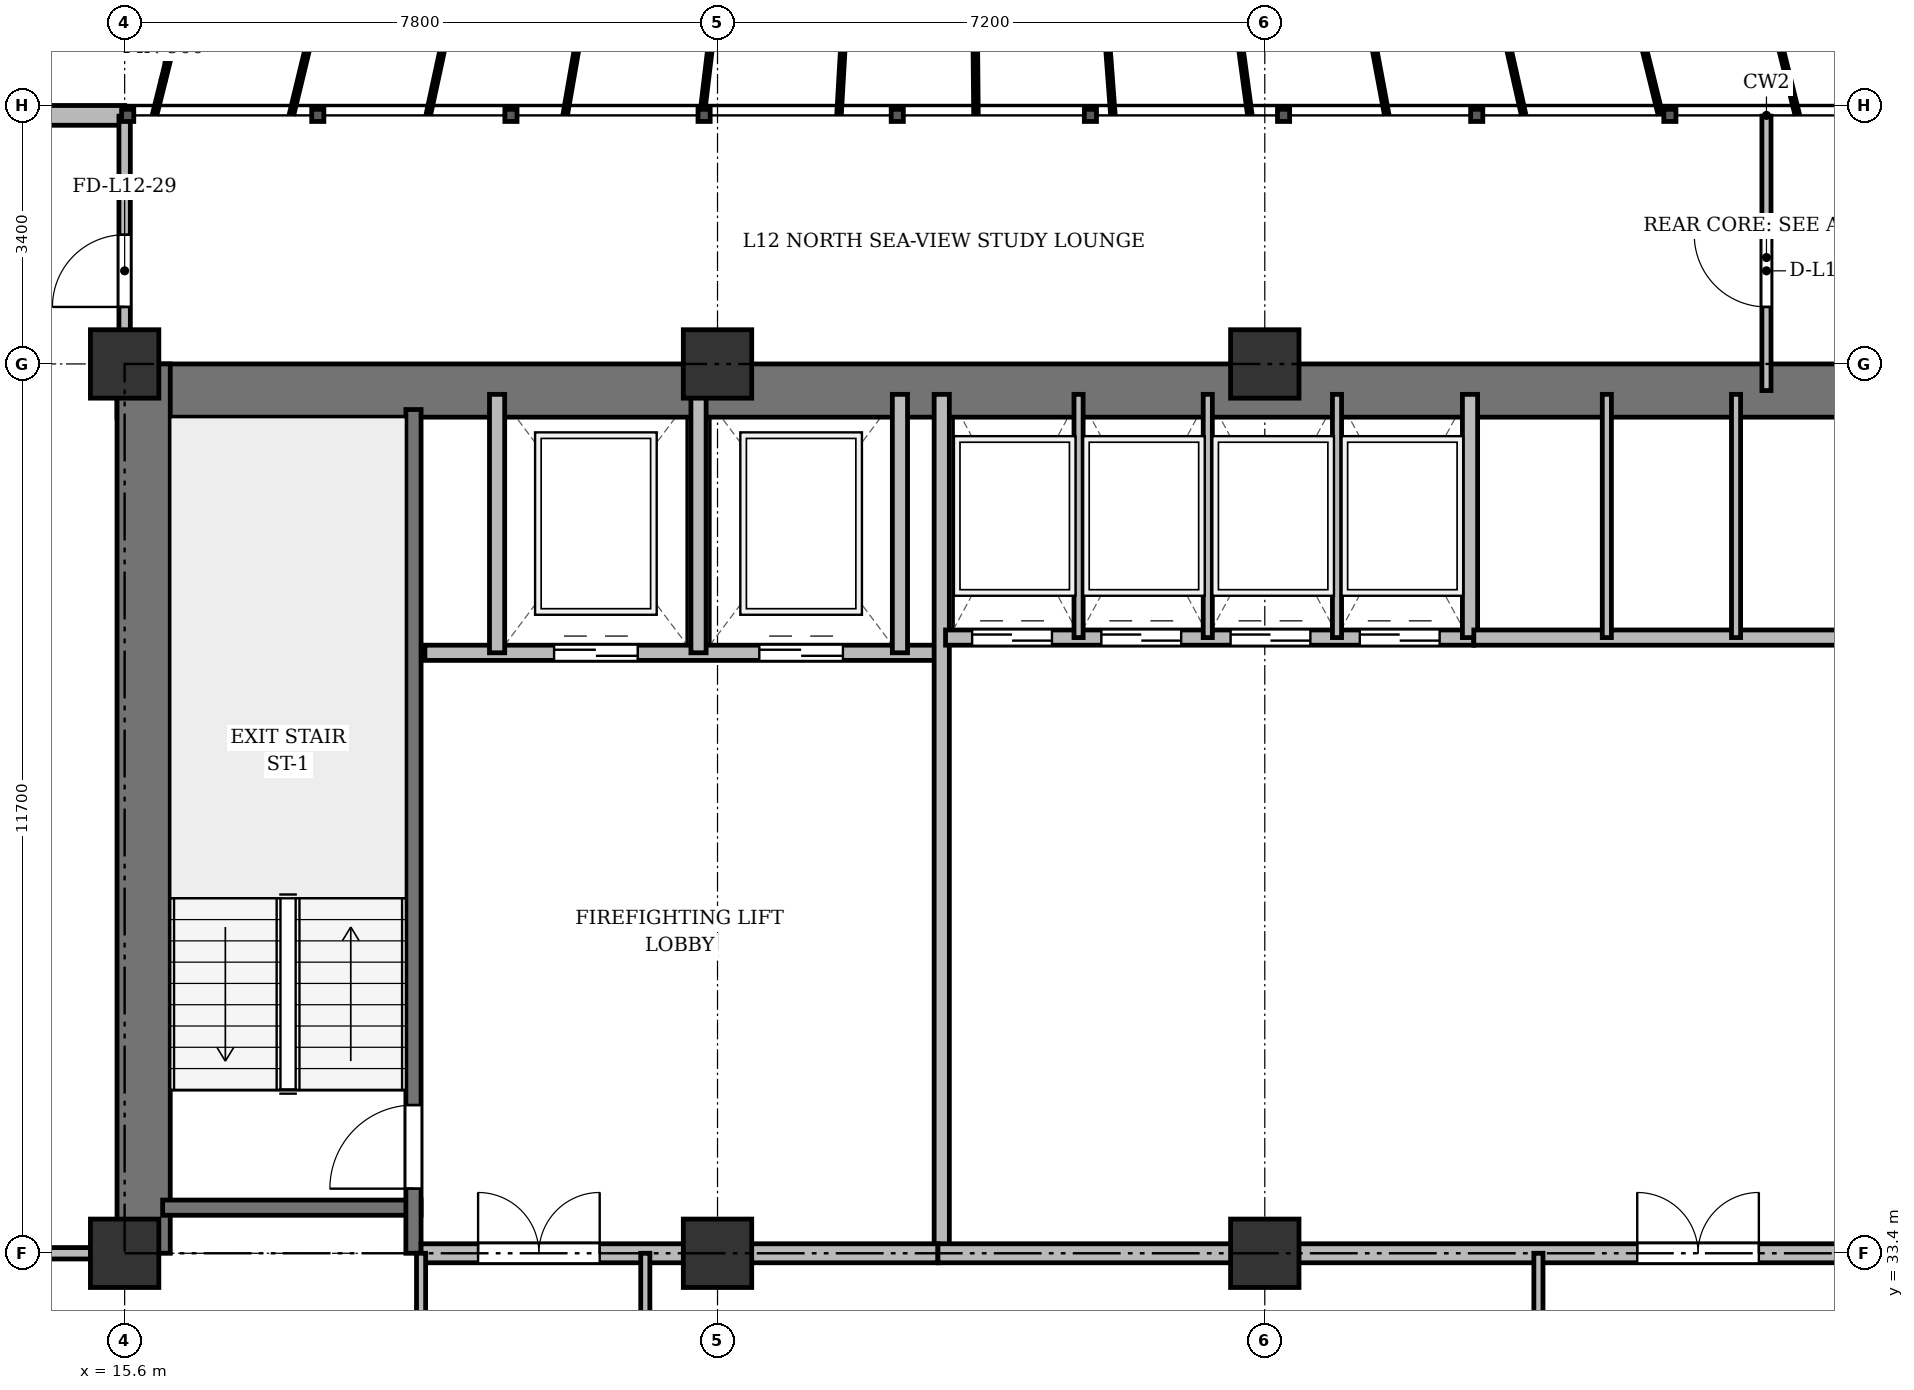
"""IFC4 building model, lengths in metres.
Left out: names, types, materials, properties, quantities, classifications, styles, units other than length and angle.
Written with IfcOpenShell. Run it as: python <this file> out.ifc"""

import sys

from ifc_helpers import new_model, si_unit, direction, frame, frame_2d, origin, origin_2d, place, context, subcontext, project, spatial, rectangle, extrude, source, transform, mapped, element, fill, save


model = new_model("IFC4")
c1 = context("Model", 3, precision=1e-05, world=origin(), true_north=direction((0.0, 1.0)))
c2 = subcontext(c1, "Body", "Model", "MODEL_VIEW")
j1 = project(units=[si_unit("LENGTHUNIT", "METRE"), si_unit("PLANEANGLEUNIT", "RADIAN")], contexts=[c1])
p1 = place(None, origin())
s1 = spatial("IfcSite", under=j1, at=p1, CompositionType="ELEMENT")
p2 = place(p1, origin())
s2 = spatial("IfcBuilding", under=s1, at=p2, CompositionType="ELEMENT")
p3 = place(p2, frame((0.0, 0.0, 48.7)))
s3 = spatial("IfcBuildingStorey", under=s2, at=p3, CompositionType="ELEMENT", Elevation=48.7)
m1 = source(origin(), c2, "Body", "SweptSolid", [
    extrude(rectangle(XDim=0.9, YDim=0.9, at=origin_2d()), origin(), (0.0, 0.0, 1.0), 3.6),
])
for number, where, z_axis, x_axis in (
    (1, (15.6, 33.4, 0.0), (0.0, 0.0, 1.0), (1.0, 0.0, 0.0)),
    (2, (15.6, 45.1, 0.0), (0.0, 0.0, 1.0), (1.0, 0.0, 0.0)),
    (3, (23.4, 33.4, 0.0), (0.0, 0.0, 1.0), (1.0, 0.0, 0.0)),
    (4, (23.4, 45.1, 0.0), (0.0, 0.0, 1.0), (1.0, 0.0, 0.0)),
    (5, (30.6, 33.4, 0.0), (0.0, 0.0, 1.0), (1.0, 0.0, 0.0)),
    (6, (30.6, 45.1, 0.0), (0.0, 0.0, 1.0), (1.0, 0.0, 0.0)),
):
    element("IfcColumn", number, at=place(p3, frame(where, z_axis=z_axis, x_axis=x_axis)), inside=s3, PredefinedType="COLUMN", context=c2, shape_type="MappedRepresentation", body=[
        mapped(m1, transform((0.0, 0.0, 0.0), x_axis=(1.0, 0.0, 0.0), y_axis=(0.0, 1.0, 0.0), z_axis=(0.0, 0.0, 1.0), scale=1.0)),
    ])
p4 = place(p3, frame((7.6, 48.37, 0.0), z_axis=(0.0, 0.0, 1.0), x_axis=(1.0, 0.0, 0.0)))
e7 = element("IfcWall", 7, at=p4, inside=s3, PredefinedType="SOLIDWALL", context=c2, shape_type="SweptSolid", body=[
    extrude(rectangle(XDim=8.0, YDim=0.26, at=frame_2d((4.0, 0.0))), origin(), (0.0, 0.0, 1.0), 3.34),
])
p5 = place(p4, frame((3.308, 0.0, 0.9)))
e8 = element("IfcOpeningElement", 8, at=p5, cuts=e7, PredefinedType="OPENING", context=c2, shape_type="SweptSolid", body=[
    extrude(rectangle(XDim=1.2, YDim=1.65, at=frame_2d((0.6, 0.825))), frame((0.0, 0.14, 0.0), z_axis=(0.0, -1.0, 0.0), x_axis=(1.0, 0.0, 0.0)), (0.0, 0.0, 1.0), 0.28),
])
p6 = place(p3, frame((15.5, 44.75, 0.0), z_axis=(0.0, 0.0, 1.0), x_axis=(1.0, 0.0, 0.0)))
e9 = element("IfcWall", 9, at=p6, inside=s3, PredefinedType="SHEAR", context=c2, shape_type="SweptSolid", body=[
    extrude(rectangle(XDim=43.4, YDim=0.7, at=frame_2d((21.7, 0.0))), origin(), (0.0, 0.0, 1.0), 3.34),
])
p7 = place(p3, frame((15.85, 33.4, 0.0), z_axis=(0.0, 0.0, 1.0), x_axis=(0.0, 1.0, 0.0)))
e10 = element("IfcWall", 10, at=p7, inside=s3, PredefinedType="SHEAR", context=c2, shape_type="SweptSolid", body=[
    extrude(rectangle(XDim=11.7, YDim=0.7, at=frame_2d((5.85, 0.0))), origin(), (0.0, 0.0, 1.0), 3.34),
])
p8 = place(p3, frame((16.1, 34.0, 0.0), z_axis=(0.0, 0.0, 1.0), x_axis=(1.0, 0.0, 0.0)))
e11 = element("IfcWall", 11, at=p8, inside=s3, PredefinedType="SHEAR", context=c2, shape_type="SweptSolid", body=[
    extrude(rectangle(XDim=3.4, YDim=0.2, at=frame_2d((1.7, 0.0))), origin(), (0.0, 0.0, 1.0), 3.34),
])
p9 = place(p3, frame((19.4, 33.4, 0.0), z_axis=(0.0, 0.0, 1.0), x_axis=(0.0, 1.0, 0.0)))
e12 = element("IfcWall", 12, at=p9, inside=s3, PredefinedType="SHEAR", context=c2, shape_type="SweptSolid", body=[
    extrude(rectangle(XDim=11.1, YDim=0.2, at=frame_2d((5.55, 0.0))), origin(), (0.0, 0.0, 1.0), 3.34),
])
p10 = place(p9, frame((0.85, 0.0, 0.0)))
e13 = element("IfcOpeningElement", 13, at=p10, cuts=e12, PredefinedType="OPENING", context=c2, shape_type="SweptSolid", body=[
    extrude(rectangle(XDim=1.1, YDim=2.15, at=frame_2d((0.55, 1.075))), frame((0.0, 0.11, 0.0), z_axis=(0.0, -1.0, 0.0), x_axis=(1.0, 0.0, 0.0)), (0.0, 0.0, 1.0), 0.22),
])
p11 = place(p3, frame((19.55, 41.3, 0.0), z_axis=(0.0, 0.0, 1.0), x_axis=(1.0, 0.0, 0.0)))
e14 = element("IfcWall", 14, at=p11, inside=s3, PredefinedType="SOLIDWALL", context=c2, shape_type="SweptSolid", body=[
    extrude(rectangle(XDim=6.75, YDim=0.2, at=frame_2d((3.375, 0.0))), origin(), (0.0, 0.0, 1.0), 3.34),
])
p12 = place(p11, frame((1.7, 0.0, 0.0)))
e15 = element("IfcOpeningElement", 15, at=p12, cuts=e14, PredefinedType="OPENING", context=c2, shape_type="SweptSolid", body=[
    extrude(rectangle(XDim=1.1, YDim=2.15, at=frame_2d((0.55, 1.075))), frame((0.0, 0.11, 0.0), z_axis=(0.0, -1.0, 0.0), x_axis=(1.0, 0.0, 0.0)), (0.0, 0.0, 1.0), 0.22),
])
p13 = place(p11, frame((4.4, 0.0, 0.0)))
e16 = element("IfcOpeningElement", 16, at=p13, cuts=e14, PredefinedType="OPENING", context=c2, shape_type="SweptSolid", body=[
    extrude(rectangle(XDim=1.1, YDim=2.15, at=frame_2d((0.55, 1.075))), frame((0.0, 0.11, 0.0), z_axis=(0.0, -1.0, 0.0), x_axis=(1.0, 0.0, 0.0)), (0.0, 0.0, 1.0), 0.22),
])
for number, where, z_axis, x_axis in (
    (17, (20.5, 41.3, 0.0), (0.0, 0.0, 1.0), (0.0, 1.0, 0.0)),
    (18, (23.15, 41.3, 0.0), (0.0, 0.0, 1.0), (0.0, 1.0, 0.0)),
    (19, (25.8, 41.3, 0.0), (0.0, 0.0, 1.0), (0.0, 1.0, 0.0)),
):
    element("IfcWall", number, at=place(p3, frame(where, z_axis=z_axis, x_axis=x_axis)), inside=s3, PredefinedType="SOLIDWALL", context=c2, shape_type="SweptSolid", body=[
        extrude(rectangle(XDim=3.4, YDim=0.2, at=frame_2d((1.7, 0.0))), origin(), (0.0, 0.0, 1.0), 3.34),
    ])
p14 = place(p3, frame((26.35, 33.4, 0.0), z_axis=(0.0, 0.0, 1.0), x_axis=(0.0, 1.0, 0.0)))
e20 = element("IfcWall", 20, at=p14, inside=s3, PredefinedType="SOLIDWALL", context=c2, shape_type="SweptSolid", body=[
    extrude(rectangle(XDim=11.3, YDim=0.2, at=frame_2d((5.65, 0.0))), origin(), (0.0, 0.0, 1.0), 2.69),
])
p15 = place(p3, frame((19.5, 33.4, 0.0), z_axis=(0.0, 0.0, 1.0), x_axis=(1.0, 0.0, 0.0)))
e21 = element("IfcWall", 21, at=p15, inside=s3, PredefinedType="PARTITIONING", context=c2, shape_type="SweptSolid", body=[
    extrude(rectangle(XDim=6.8, YDim=0.25, at=frame_2d((3.4, 0.0))), origin(), (0.0, 0.0, 1.0), 2.69),
])
p16 = place(p15, frame((0.75, 0.0, 0.0)))
e22 = element("IfcOpeningElement", 22, at=p16, cuts=e21, PredefinedType="OPENING", context=c2, shape_type="SweptSolid", body=[
    extrude(rectangle(XDim=1.6, YDim=2.2, at=frame_2d((0.8, 1.1))), frame((0.0, 0.135, 0.0), z_axis=(0.0, -1.0, 0.0), x_axis=(1.0, 0.0, 0.0)), (0.0, 0.0, 1.0), 0.27),
])
p17 = place(p3, frame((26.4, 41.5, 0.0), z_axis=(0.0, 0.0, 1.0), x_axis=(1.0, 0.0, 0.0)))
e23 = element("IfcWall", 23, at=p17, inside=s3, PredefinedType="SOLIDWALL", context=c2, shape_type="SweptSolid", body=[
    extrude(rectangle(XDim=6.95, YDim=0.2, at=frame_2d((3.475, 0.0))), origin(), (0.0, 0.0, 1.0), 3.34),
])
p18 = place(p17, frame((0.35, 0.0, 0.0)))
e24 = element("IfcOpeningElement", 24, at=p18, cuts=e23, PredefinedType="OPENING", context=c2, shape_type="SweptSolid", body=[
    extrude(rectangle(XDim=1.05, YDim=2.15, at=frame_2d((0.525, 1.075))), frame((0.0, 0.11, 0.0), z_axis=(0.0, -1.0, 0.0), x_axis=(1.0, 0.0, 0.0)), (0.0, 0.0, 1.0), 0.22),
])
p19 = place(p17, frame((2.05, 0.0, 0.0)))
e25 = element("IfcOpeningElement", 25, at=p19, cuts=e23, PredefinedType="OPENING", context=c2, shape_type="SweptSolid", body=[
    extrude(rectangle(XDim=1.05, YDim=2.15, at=frame_2d((0.525, 1.075))), frame((0.0, 0.11, 0.0), z_axis=(0.0, -1.0, 0.0), x_axis=(1.0, 0.0, 0.0)), (0.0, 0.0, 1.0), 0.22),
])
p20 = place(p17, frame((3.75, 0.0, 0.0)))
e26 = element("IfcOpeningElement", 26, at=p20, cuts=e23, PredefinedType="OPENING", context=c2, shape_type="SweptSolid", body=[
    extrude(rectangle(XDim=1.05, YDim=2.15, at=frame_2d((0.525, 1.075))), frame((0.0, 0.11, 0.0), z_axis=(0.0, -1.0, 0.0), x_axis=(1.0, 0.0, 0.0)), (0.0, 0.0, 1.0), 0.22),
])
p21 = place(p17, frame((5.45, 0.0, 0.0)))
e27 = element("IfcOpeningElement", 27, at=p21, cuts=e23, PredefinedType="OPENING", context=c2, shape_type="SweptSolid", body=[
    extrude(rectangle(XDim=1.05, YDim=2.15, at=frame_2d((0.525, 1.075))), frame((0.0, 0.11, 0.0), z_axis=(0.0, -1.0, 0.0), x_axis=(1.0, 0.0, 0.0)), (0.0, 0.0, 1.0), 0.22),
])
p22 = place(p3, frame((33.3, 41.5, 0.0), z_axis=(0.0, 0.0, 1.0), x_axis=(0.0, 1.0, 0.0)))
e28 = element("IfcWall", 28, at=p22, inside=s3, PredefinedType="SOLIDWALL", context=c2, shape_type="SweptSolid", body=[
    extrude(rectangle(XDim=3.2, YDim=0.2, at=frame_2d((1.6, 0.0))), origin(), (0.0, 0.0, 1.0), 3.34),
])
for number, where, z_axis, x_axis in (
    (29, (28.15, 41.5, 0.0), (0.0, 0.0, 1.0), (0.0, 1.0, 0.0)),
    (30, (29.85, 41.5, 0.0), (0.0, 0.0, 1.0), (0.0, 1.0, 0.0)),
    (31, (31.55, 41.5, 0.0), (0.0, 0.0, 1.0), (0.0, 1.0, 0.0)),
):
    element("IfcWall", number, at=place(p3, frame(where, z_axis=z_axis, x_axis=x_axis)), inside=s3, PredefinedType="PARTITIONING", context=c2, shape_type="SweptSolid", body=[
        extrude(rectangle(XDim=3.2, YDim=0.12, at=frame_2d((1.6, 0.0))), origin(), (0.0, 0.0, 1.0), 3.34),
    ])
p23 = place(p3, frame((33.35, 41.5, 0.0), z_axis=(0.0, 0.0, 1.0), x_axis=(1.0, 0.0, 0.0)))
e32 = element("IfcWall", 32, at=p23, inside=s3, PredefinedType="SOLIDWALL", context=c2, shape_type="SweptSolid", body=[
    extrude(rectangle(XDim=6.9, YDim=0.2, at=frame_2d((3.45, 0.0))), origin(), (0.0, 0.0, 1.0), 3.34),
])
for number, where, z_axis, x_axis in (
    (33, (35.1, 41.5, 0.0), (0.0, 0.0, 1.0), (0.0, 1.0, 0.0)),
    (34, (36.8, 41.5, 0.0), (0.0, 0.0, 1.0), (0.0, 1.0, 0.0)),
):
    element("IfcWall", number, at=place(p3, frame(where, z_axis=z_axis, x_axis=x_axis)), inside=s3, PredefinedType="PARTITIONING", context=c2, shape_type="SweptSolid", body=[
        extrude(rectangle(XDim=3.2, YDim=0.12, at=frame_2d((1.6, 0.0))), origin(), (0.0, 0.0, 1.0), 3.34),
    ])
p24 = place(p3, frame((26.3, 33.4, 0.0), z_axis=(0.0, 0.0, 1.0), x_axis=(1.0, 0.0, 0.0)))
e35 = element("IfcWall", 35, at=p24, inside=s3, PredefinedType="PARTITIONING", context=c2, shape_type="SweptSolid", body=[
    extrude(rectangle(XDim=20.85, YDim=0.25, at=frame_2d((10.425, 0.0))), origin(), (0.0, 0.0, 1.0), 2.69),
])
p25 = place(p24, frame((9.2, 0.0, 0.0)))
e36 = element("IfcOpeningElement", 36, at=p25, cuts=e35, PredefinedType="OPENING", context=c2, shape_type="SweptSolid", body=[
    extrude(rectangle(XDim=1.6, YDim=2.2, at=frame_2d((0.8, 1.1))), frame((0.0, 0.135, 0.0), z_axis=(0.0, -1.0, 0.0), x_axis=(1.0, 0.0, 0.0)), (0.0, 0.0, 1.0), 0.27),
])
for number, where, z_axis, x_axis in (
    (37, (19.5, 29.8, 0.0), (0.0, 0.0, 1.0), (0.0, 1.0, 0.0)),
    (38, (22.45, 29.8, 0.0), (0.0, 0.0, 1.0), (0.0, 1.0, 0.0)),
    (39, (34.2, 29.8, 0.0), (0.0, 0.0, 1.0), (0.0, 1.0, 0.0)),
):
    element("IfcWall", number, at=place(p3, frame(where, z_axis=z_axis, x_axis=x_axis)), inside=s3, PredefinedType="PARTITIONING", context=c2, shape_type="SweptSolid", body=[
        extrude(rectangle(XDim=3.6, YDim=0.12, at=frame_2d((1.8, 0.0))), origin(), (0.0, 0.0, 1.0), 2.69),
    ])
p26 = place(p3, frame((4.75, 33.4, 0.0), z_axis=(0.0, 0.0, 1.0), x_axis=(1.0, 0.0, 0.0)))
e40 = element("IfcWall", 40, at=p26, inside=s3, PredefinedType="PARTITIONING", context=c2, shape_type="SweptSolid", body=[
    extrude(rectangle(XDim=10.85, YDim=0.15, at=frame_2d((5.425, 0.0))), origin(), (0.0, 0.0, 1.0), 2.69),
])
p27 = place(p26, frame((4.94, 0.0, 0.0)))
e41 = element("IfcOpeningElement", 41, at=p27, cuts=e40, PredefinedType="OPENING", context=c2, shape_type="SweptSolid", body=[
    extrude(rectangle(XDim=0.95, YDim=2.15, at=frame_2d((0.475, 1.075))), frame((0.0, 0.085, 0.0), z_axis=(0.0, -1.0, 0.0), x_axis=(1.0, 0.0, 0.0)), (0.0, 0.0, 1.0), 0.17),
])
p28 = place(p3, frame((37.2, 44.75, 0.0), z_axis=(0.0, 0.0, 1.0), x_axis=(0.0, 1.0, 0.0)))
e42 = element("IfcWall", 42, at=p28, inside=s3, PredefinedType="PARTITIONING", context=c2, shape_type="SweptSolid", body=[
    extrude(rectangle(XDim=3.61, YDim=0.12, at=frame_2d((1.805, 0.0))), origin(), (0.0, 0.0, 1.0), 2.69),
])
p29 = place(p28, frame((1.1, 0.0, 0.0)))
e43 = element("IfcOpeningElement", 43, at=p29, cuts=e42, PredefinedType="OPENING", context=c2, shape_type="SweptSolid", body=[
    extrude(rectangle(XDim=0.95, YDim=2.15, at=frame_2d((0.475, 1.075))), frame((0.0, 0.07, 0.0), z_axis=(0.0, -1.0, 0.0), x_axis=(1.0, 0.0, 0.0)), (0.0, 0.0, 1.0), 0.14),
])
p30 = place(p3, frame((15.6, 44.75, 0.0), z_axis=(0.0, 0.0, 1.0), x_axis=(0.0, 1.0, 0.0)))
e44 = element("IfcWall", 44, at=p30, inside=s3, PredefinedType="PARTITIONING", context=c2, shape_type="SweptSolid", body=[
    extrude(rectangle(XDim=3.61, YDim=0.15, at=frame_2d((1.805, 0.0))), origin(), (0.0, 0.0, 1.0), 2.752),
])
p31 = place(p30, frame((1.1, 0.0, 0.0)))
e45 = element("IfcOpeningElement", 45, at=p31, cuts=e44, PredefinedType="OPENING", context=c2, shape_type="SweptSolid", body=[
    extrude(rectangle(XDim=0.95, YDim=2.15, at=frame_2d((0.475, 1.075))), frame((0.0, 0.085, 0.0), z_axis=(0.0, -1.0, 0.0), x_axis=(1.0, 0.0, 0.0)), (0.0, 0.0, 1.0), 0.17),
])
m2 = source(origin(), c2, "Body", "SweptSolid", [
    extrude(rectangle(XDim=1.1, YDim=2.15, at=frame_2d((0.55, 1.075))), frame((0.0, 0.025, 0.0), z_axis=(0.0, -1.0, 0.0), x_axis=(1.0, 0.0, 0.0)), (0.0, 0.0, 1.0), 0.05),
])
p32 = place(p10, origin())
e46 = element("IfcDoor", 46, at=p32, inside=s3, OperationType="SINGLE_SWING_LEFT", PredefinedType="DOOR", context=c2, shape_type="MappedRepresentation", body=[
    mapped(m2, transform((0.0, 0.0, 0.0), x_axis=(1.0, 0.0, 0.0), y_axis=(0.0, 1.0, 0.0), z_axis=(0.0, 0.0, 1.0), scale=1.0)),
])
fill(e13, e46)
p33 = place(p12, origin())
e47 = element("IfcDoor", 47, at=p33, inside=s3, OperationType="DOUBLE_DOOR_SLIDING", PredefinedType="DOOR", context=c2, shape_type="MappedRepresentation", body=[
    mapped(m2, transform((0.0, 0.0, 0.0), x_axis=(1.0, 0.0, 0.0), y_axis=(0.0, 1.0, 0.0), z_axis=(0.0, 0.0, 1.0), scale=1.0)),
])
fill(e15, e47)
p34 = place(p13, origin())
e48 = element("IfcDoor", 48, at=p34, inside=s3, OperationType="DOUBLE_DOOR_SLIDING", PredefinedType="DOOR", context=c2, shape_type="MappedRepresentation", body=[
    mapped(m2, transform((0.0, 0.0, 0.0), x_axis=(1.0, 0.0, 0.0), y_axis=(0.0, 1.0, 0.0), z_axis=(0.0, 0.0, 1.0), scale=1.0)),
])
fill(e16, e48)
m3 = source(origin(), c2, "Body", "SweptSolid", [
    extrude(rectangle(XDim=1.6, YDim=2.2, at=frame_2d((0.8, 1.1))), frame((0.0, 0.025, 0.0), z_axis=(0.0, -1.0, 0.0), x_axis=(1.0, 0.0, 0.0)), (0.0, 0.0, 1.0), 0.05),
])
p35 = place(p16, origin())
e49 = element("IfcDoor", 49, at=p35, inside=s3, OperationType="DOUBLE_DOOR_SINGLE_SWING", PredefinedType="DOOR", context=c2, shape_type="MappedRepresentation", body=[
    mapped(m3, transform((0.0, 0.0, 0.0), x_axis=(1.0, 0.0, 0.0), y_axis=(0.0, 1.0, 0.0), z_axis=(0.0, 0.0, 1.0), scale=1.0)),
])
fill(e22, e49)
m4 = source(origin(), c2, "Body", "SweptSolid", [
    extrude(rectangle(XDim=1.05, YDim=2.15, at=frame_2d((0.525, 1.075))), frame((0.0, 0.025, 0.0), z_axis=(0.0, -1.0, 0.0), x_axis=(1.0, 0.0, 0.0)), (0.0, 0.0, 1.0), 0.05),
])
p36 = place(p18, origin())
e50 = element("IfcDoor", 50, at=p36, inside=s3, OperationType="DOUBLE_DOOR_SLIDING", PredefinedType="DOOR", context=c2, shape_type="MappedRepresentation", body=[
    mapped(m4, transform((0.0, 0.0, 0.0), x_axis=(1.0, 0.0, 0.0), y_axis=(0.0, 1.0, 0.0), z_axis=(0.0, 0.0, 1.0), scale=1.0)),
])
fill(e24, e50)
p37 = place(p19, origin())
e51 = element("IfcDoor", 51, at=p37, inside=s3, OperationType="DOUBLE_DOOR_SLIDING", PredefinedType="DOOR", context=c2, shape_type="MappedRepresentation", body=[
    mapped(m4, transform((0.0, 0.0, 0.0), x_axis=(1.0, 0.0, 0.0), y_axis=(0.0, 1.0, 0.0), z_axis=(0.0, 0.0, 1.0), scale=1.0)),
])
fill(e25, e51)
p38 = place(p20, origin())
e52 = element("IfcDoor", 52, at=p38, inside=s3, OperationType="DOUBLE_DOOR_SLIDING", PredefinedType="DOOR", context=c2, shape_type="MappedRepresentation", body=[
    mapped(m4, transform((0.0, 0.0, 0.0), x_axis=(1.0, 0.0, 0.0), y_axis=(0.0, 1.0, 0.0), z_axis=(0.0, 0.0, 1.0), scale=1.0)),
])
fill(e26, e52)
p39 = place(p21, origin())
e53 = element("IfcDoor", 53, at=p39, inside=s3, OperationType="DOUBLE_DOOR_SLIDING", PredefinedType="DOOR", context=c2, shape_type="MappedRepresentation", body=[
    mapped(m4, transform((0.0, 0.0, 0.0), x_axis=(1.0, 0.0, 0.0), y_axis=(0.0, 1.0, 0.0), z_axis=(0.0, 0.0, 1.0), scale=1.0)),
])
fill(e27, e53)
p40 = place(p25, origin())
e54 = element("IfcDoor", 54, at=p40, inside=s3, OperationType="DOUBLE_DOOR_SINGLE_SWING", PredefinedType="DOOR", context=c2, shape_type="MappedRepresentation", body=[
    mapped(m3, transform((0.0, 0.0, 0.0), x_axis=(1.0, 0.0, 0.0), y_axis=(0.0, 1.0, 0.0), z_axis=(0.0, 0.0, 1.0), scale=1.0)),
])
fill(e36, e54)
m5 = source(origin(), c2, "Body", "SweptSolid", [
    extrude(rectangle(XDim=0.95, YDim=2.15, at=frame_2d((0.475, 1.075))), frame((0.0, 0.025, 0.0), z_axis=(0.0, -1.0, 0.0), x_axis=(1.0, 0.0, 0.0)), (0.0, 0.0, 1.0), 0.05),
])
p41 = place(p29, origin())
e55 = element("IfcDoor", 55, at=p41, inside=s3, OperationType="SINGLE_SWING_RIGHT", PredefinedType="DOOR", context=c2, shape_type="MappedRepresentation", body=[
    mapped(m5, transform((0.0, 0.0, 0.0), x_axis=(1.0, 0.0, 0.0), y_axis=(0.0, 1.0, 0.0), z_axis=(0.0, 0.0, 1.0), scale=1.0)),
])
fill(e43, e55)
p42 = place(p31, origin())
e56 = element("IfcDoor", 56, at=p42, inside=s3, OperationType="SINGLE_SWING_LEFT", PredefinedType="DOOR", context=c2, shape_type="MappedRepresentation", body=[
    mapped(m5, transform((0.0, 0.0, 0.0), x_axis=(1.0, 0.0, 0.0), y_axis=(0.0, 1.0, 0.0), z_axis=(0.0, 0.0, 1.0), scale=1.0)),
])
fill(e45, e56)
save(model, sys.argv[1])
